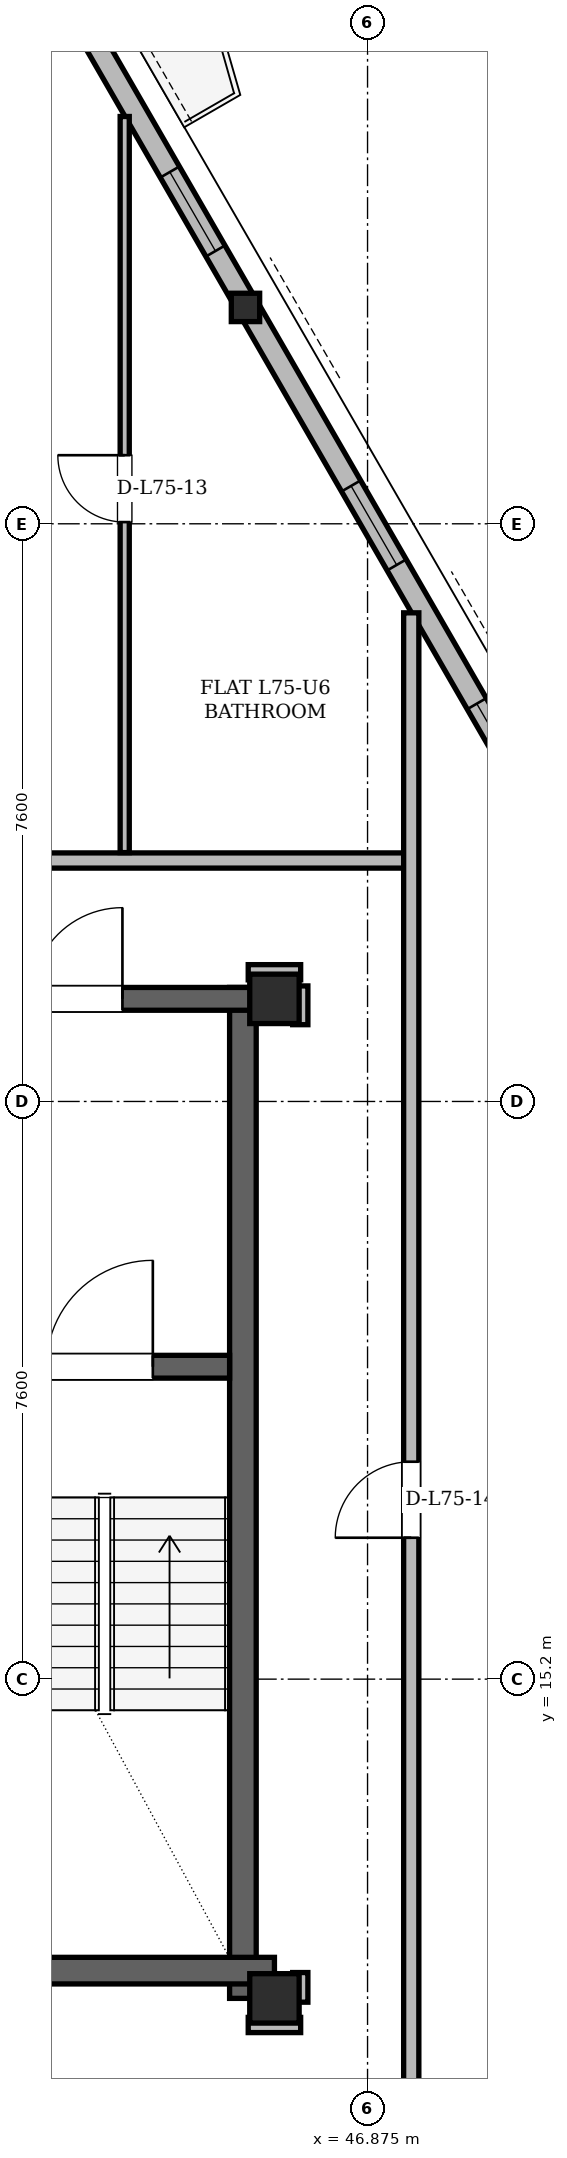
"""IFC4 building model, lengths in metres.
Left out: names, types, materials, properties, quantities, classifications, styles, units other than length and angle.
Written with IfcOpenShell. Run it as: python <this file> out.ifc"""

import sys

from ifc_helpers import new_model, si_unit, direction, frame, frame_2d, origin, origin_2d, place, context, subcontext, project, spatial, rectangle, hollow_rectangle, i_section, extrude, element, fill, save


model = new_model("IFC4")
c1 = context("Model", 3, precision=1e-05, world=origin(), true_north=direction((0.0, 1.0)))
c2 = subcontext(c1, "Body", "Model", "MODEL_VIEW")
j1 = project(units=[si_unit("LENGTHUNIT", "METRE"), si_unit("PLANEANGLEUNIT", "RADIAN")], contexts=[c1])
p1 = place(None, origin())
s1 = spatial("IfcSite", under=j1, at=p1, CompositionType="ELEMENT")
p2 = place(p1, origin())
s2 = spatial("IfcBuilding", under=s1, at=p2, CompositionType="ELEMENT")
p3 = place(p2, frame((0.0, 0.0, 285.0)))
s3 = spatial("IfcBuildingStorey", under=s2, at=p3, CompositionType="ELEMENT", Elevation=285.0)
for number, where, z_axis, x_axis in (
    (1, (45.65, 11.0, 0.0), (0.0, 0.0, 1.0), (1.0, 0.0, 0.0)),
    (2, (45.65, 24.15, 0.0), (0.0, 0.0, 1.0), (1.0, 0.0, 0.0)),
):
    element("IfcColumn", number, at=place(p3, frame(where, z_axis=z_axis, x_axis=x_axis)), inside=s3, PredefinedType="COLUMN", context=c2, shape_type="SweptSolid", body=[
        extrude(hollow_rectangle(XDim=0.65, YDim=0.65, WallThickness=0.05, at=origin_2d()), origin(), (0.0, 0.0, 1.0), 3.9),
    ])
p4 = place(p3, frame((45.296, 33.257, 0.004), z_axis=(-0.013990144915, -0.005395302523, 0.999887576958), x_axis=(0.359820037684, -0.933021725621, 0.0)))
e3 = element("IfcColumn", 3, at=p4, inside=s3, PredefinedType="COLUMN", context=c2, shape_type="SweptSolid", body=[
    extrude(i_section(OverallWidth=0.373, OverallDepth=0.373, WebThickness=0.016, FlangeThickness=0.026, at=origin_2d()), origin(), (0.0, 0.0, 1.0), 3.892),
])
p5 = place(p3, frame((45.235, 11.0, 0.0), z_axis=(0.0, 0.0, 1.0), x_axis=(0.0, 1.0, 0.0)))
e4 = element("IfcWall", 4, at=p5, inside=s3, PredefinedType="SHEAR", context=c2, shape_type="SweptSolid", body=[
    extrude(rectangle(XDim=13.3, YDim=0.35, at=frame_2d((6.65, 0.0))), origin(), (0.0, 0.0, 1.0), 3.68),
])
p6 = place(p3, frame((38.55, 11.365, 0.0), z_axis=(0.0, 0.0, 1.0), x_axis=(1.0, 0.0, 0.0)))
e5 = element("IfcWall", 5, at=p6, inside=s3, PredefinedType="SHEAR", context=c2, shape_type="SweptSolid", body=[
    extrude(rectangle(XDim=7.1, YDim=0.35, at=frame_2d((3.55, 0.0))), origin(), (0.0, 0.0, 1.0), 3.68),
])
p7 = place(p3, frame((29.65, 24.15, 0.0), z_axis=(0.0, 0.0, 1.0), x_axis=(1.0, 0.0, 0.0)))
e6 = element("IfcWall", 6, at=p7, inside=s3, PredefinedType="SHEAR", context=c2, shape_type="SweptSolid", body=[
    extrude(rectangle(XDim=15.7, YDim=0.3, at=frame_2d((7.85, 0.0))), origin(), (0.0, 0.0, 1.0), 3.68),
])
p8 = place(p7, frame((1.7, 0.0, 0.0)))
e7 = element("IfcOpeningElement", 7, at=p8, cuts=e6, PredefinedType="OPENING", context=c2, shape_type="SweptSolid", body=[
    extrude(rectangle(XDim=1.2, YDim=2.2, at=frame_2d((0.6, 1.1))), frame((0.0, 0.15, 0.0), z_axis=(0.0, -1.0, 0.0), x_axis=(1.0, 0.0, 0.0)), (0.0, 0.0, 1.0), 0.3),
])
p9 = place(p7, frame((12.8, 0.0, 0.0)))
e8 = element("IfcOpeningElement", 8, at=p9, cuts=e6, PredefinedType="OPENING", context=c2, shape_type="SweptSolid", body=[
    extrude(rectangle(XDim=1.2, YDim=2.2, at=frame_2d((0.6, 1.1))), frame((0.0, 0.15, 0.0), z_axis=(0.0, -1.0, 0.0), x_axis=(1.0, 0.0, 0.0)), (0.0, 0.0, 1.0), 0.3),
])
p10 = place(p7, frame((6.55, 0.0, 0.0)))
e9 = element("IfcOpeningElement", 9, at=p10, cuts=e6, PredefinedType="OPENING", context=c2, shape_type="SweptSolid", body=[
    extrude(rectangle(XDim=0.9, YDim=2.05, at=frame_2d((0.45, 1.025))), frame((0.0, 0.15, 0.0), z_axis=(0.0, -1.0, 0.0), x_axis=(1.0, 0.0, 0.0)), (0.0, 0.0, 1.0), 0.3),
])
p11 = place(p7, frame((8.45, 0.0, 0.0)))
e10 = element("IfcOpeningElement", 10, at=p11, cuts=e6, PredefinedType="OPENING", context=c2, shape_type="SweptSolid", body=[
    extrude(rectangle(XDim=0.9, YDim=2.05, at=frame_2d((0.45, 1.025))), frame((0.0, 0.15, 0.0), z_axis=(0.0, -1.0, 0.0), x_axis=(1.0, 0.0, 0.0)), (0.0, 0.0, 1.0), 0.3),
])
p12 = place(p3, frame((41.05, 19.31, 0.0), z_axis=(0.0, 0.0, 1.0), x_axis=(1.0, 0.0, 0.0)))
e11 = element("IfcWall", 11, at=p12, inside=s3, PredefinedType="SHEAR", context=c2, shape_type="SweptSolid", body=[
    extrude(rectangle(XDim=4.01, YDim=0.3, at=frame_2d((2.005, 0.0))), origin(), (0.0, 0.0, 1.0), 3.68),
])
p13 = place(p12, frame((1.6, 0.0, 0.0)))
e12 = element("IfcOpeningElement", 12, at=p13, cuts=e11, PredefinedType="OPENING", context=c2, shape_type="SweptSolid", body=[
    extrude(rectangle(XDim=1.4, YDim=2.2, at=frame_2d((0.7, 1.1))), frame((0.0, 0.15, 0.0), z_axis=(0.0, -1.0, 0.0), x_axis=(1.0, 0.0, 0.0)), (0.0, 0.0, 1.0), 0.3),
])
p14 = place(p3, frame((58.415, 10.535, 0.0), z_axis=(0.0, 0.0, 1.0), x_axis=(-0.499999864727, 0.866025481884, 0.0)))
e13 = element("IfcWall", 13, at=p14, inside=s3, PredefinedType="SOLIDWALL", context=c2, shape_type="SweptSolid", body=[
    extrude(rectangle(XDim=37.481, YDim=0.29, at=frame_2d((18.74, 0.0))), origin(), (0.0, 0.0, 1.0), 3.058),
])
p15 = place(p14, frame((7.504, 0.0, 0.0)))
e14 = element("IfcOpeningElement", 14, at=p15, cuts=e13, PredefinedType="OPENING", context=c2, shape_type="SweptSolid", body=[
    extrude(rectangle(XDim=1.3, YDim=2.2, at=frame_2d((0.65, 1.1))), frame((0.0, 0.145, 0.0), z_axis=(0.0, -1.0, 0.0), x_axis=(1.0, 0.0, 0.0)), (0.0, 0.0, 1.0), 0.29),
])
p16 = place(p14, frame((32.341, 0.0, 0.0)))
e15 = element("IfcOpeningElement", 15, at=p16, cuts=e13, PredefinedType="OPENING", context=c2, shape_type="SweptSolid", body=[
    extrude(rectangle(XDim=1.5, YDim=2.2, at=frame_2d((0.75, 1.1))), frame((0.0, 0.145, 0.0), z_axis=(0.0, -1.0, 0.0), x_axis=(1.0, 0.0, 0.0)), (0.0, 0.0, 1.0), 0.29),
])
p17 = place(p14, frame((12.54, 0.0, 0.85)))
e16 = element("IfcOpeningElement", 16, at=p17, cuts=e13, PredefinedType="OPENING", context=c2, shape_type="SweptSolid", body=[
    extrude(rectangle(XDim=1.4, YDim=1.6, at=frame_2d((0.7, 0.8))), frame((0.0, 0.145, 0.0), z_axis=(0.0, -1.0, 0.0), x_axis=(1.0, 0.0, 0.0)), (0.0, 0.0, 1.0), 0.29),
])
p18 = place(p14, frame((17.705, 0.0, 0.85)))
e17 = element("IfcOpeningElement", 17, at=p18, cuts=e13, PredefinedType="OPENING", context=c2, shape_type="SweptSolid", body=[
    extrude(rectangle(XDim=2.5, YDim=2.098, at=frame_2d((1.25, 1.049))), frame((0.0, 0.145, 0.0), z_axis=(0.0, -1.0, 0.0), x_axis=(1.0, 0.0, 0.0)), (0.0, 0.0, 1.0), 0.29),
])
p19 = place(p14, frame((2.467, 0.0, 0.85)))
e18 = element("IfcOpeningElement", 18, at=p19, cuts=e13, PredefinedType="OPENING", context=c2, shape_type="SweptSolid", body=[
    extrude(rectangle(XDim=2.5, YDim=2.098, at=frame_2d((1.25, 1.049))), frame((0.0, 0.145, 0.0), z_axis=(0.0, -1.0, 0.0), x_axis=(1.0, 0.0, 0.0)), (0.0, 0.0, 1.0), 0.29),
])
p20 = place(p14, frame((27.081, 0.0, 0.85)))
e19 = element("IfcOpeningElement", 19, at=p20, cuts=e13, PredefinedType="OPENING", context=c2, shape_type="SweptSolid", body=[
    extrude(rectangle(XDim=1.2, YDim=1.48, at=frame_2d((0.6, 0.74))), frame((0.0, 0.145, 0.0), z_axis=(0.0, -1.0, 0.0), x_axis=(1.0, 0.0, 0.0)), (0.0, 0.0, 1.0), 0.29),
])
p21 = place(p14, frame((34.388, 0.0, 0.85)))
e20 = element("IfcOpeningElement", 20, at=p21, cuts=e13, PredefinedType="OPENING", context=c2, shape_type="SweptSolid", body=[
    extrude(rectangle(XDim=1.8, YDim=1.75, at=frame_2d((0.9, 0.875))), frame((0.0, 0.145, 0.0), z_axis=(0.0, -1.0, 0.0), x_axis=(1.0, 0.0, 0.0)), (0.0, 0.0, 1.0), 0.29),
])
p22 = place(p14, frame((22.312, 0.0, 0.85)))
e21 = element("IfcOpeningElement", 21, at=p22, cuts=e13, PredefinedType="OPENING", context=c2, shape_type="SweptSolid", body=[
    extrude(rectangle(XDim=1.2, YDim=1.48, at=frame_2d((0.6, 0.74))), frame((0.0, 0.145, 0.0), z_axis=(0.0, -1.0, 0.0), x_axis=(1.0, 0.0, 0.0)), (0.0, 0.0, 1.0), 0.29),
])
p23 = place(p3, frame((45.305, 10.65, 0.0), z_axis=(0.0, 0.0, 1.0), x_axis=(1.0, 0.0, 0.0)))
e22 = element("IfcWall", 22, at=p23, inside=s3, PredefinedType="PARTITIONING", context=c2, shape_type="SweptSolid", body=[
    extrude(rectangle(XDim=0.69, YDim=0.2, at=frame_2d((0.345, 0.0))), origin(), (0.0, 0.0, 1.0), 3.68),
])
p24 = place(p3, frame((45.305, 24.5, 0.0), z_axis=(0.0, 0.0, 1.0), x_axis=(1.0, 0.0, 0.0)))
e23 = element("IfcWall", 23, at=p24, inside=s3, PredefinedType="PARTITIONING", context=c2, shape_type="SweptSolid", body=[
    extrude(rectangle(XDim=0.69, YDim=0.2, at=frame_2d((0.345, 0.0))), origin(), (0.0, 0.0, 1.0), 3.266),
])
p25 = place(p3, frame((25.67, 25.97, 0.0), z_axis=(0.0, 0.0, 1.0), x_axis=(1.0, 0.0, 0.0)))
e24 = element("IfcWall", 24, at=p25, inside=s3, PredefinedType="PARTITIONING", context=c2, shape_type="SweptSolid", body=[
    extrude(rectangle(XDim=21.78, YDim=0.2, at=frame_2d((10.89, 0.0))), origin(), (0.0, 0.0, 1.0), 3.266),
])
p26 = place(p25, frame((3.709, 0.0, 0.0)))
e25 = element("IfcOpeningElement", 25, at=p26, cuts=e24, PredefinedType="OPENING", context=c2, shape_type="SweptSolid", body=[
    extrude(rectangle(XDim=1.0, YDim=2.18, at=frame_2d((0.5, 1.09))), frame((0.0, 0.1, 0.0), z_axis=(0.0, -1.0, 0.0), x_axis=(1.0, 0.0, 0.0)), (0.0, 0.0, 1.0), 0.2),
])
p27 = place(p25, frame((9.68, 0.0, 0.0)))
e26 = element("IfcOpeningElement", 26, at=p27, cuts=e24, PredefinedType="OPENING", context=c2, shape_type="SweptSolid", body=[
    extrude(rectangle(XDim=1.3, YDim=2.2, at=frame_2d((0.65, 1.1))), frame((0.0, 0.1, 0.0), z_axis=(0.0, -1.0, 0.0), x_axis=(1.0, 0.0, 0.0)), (0.0, 0.0, 1.0), 0.2),
])
p28 = place(p25, frame((14.872, 0.0, 0.0)))
e27 = element("IfcOpeningElement", 27, at=p28, cuts=e24, PredefinedType="OPENING", context=c2, shape_type="SweptSolid", body=[
    extrude(rectangle(XDim=1.0, YDim=2.18, at=frame_2d((0.5, 1.09))), frame((0.0, 0.1, 0.0), z_axis=(0.0, -1.0, 0.0), x_axis=(1.0, 0.0, 0.0)), (0.0, 0.0, 1.0), 0.2),
])
p29 = place(p3, frame((43.68, 26.074, 0.0), z_axis=(0.0, 0.0, 1.0), x_axis=(0.0, 1.0, 0.0)))
e28 = element("IfcWall", 28, at=p29, inside=s3, PredefinedType="PARTITIONING", context=c2, shape_type="SweptSolid", body=[
    extrude(rectangle(XDim=9.684, YDim=0.12, at=frame_2d((4.842, 0.0))), origin(), (0.0, 0.0, 1.0), 3.266),
])
p30 = place(p29, frame((4.348, 0.0, 0.0)))
e29 = element("IfcOpeningElement", 29, at=p30, cuts=e28, PredefinedType="OPENING", context=c2, shape_type="SweptSolid", body=[
    extrude(rectangle(XDim=0.88, YDim=2.08, at=frame_2d((0.44, 1.04))), frame((0.0, 0.06, 0.0), z_axis=(0.0, -1.0, 0.0), x_axis=(1.0, 0.0, 0.0)), (0.0, 0.0, 1.0), 0.12),
])
p31 = place(p3, frame((45.99, 10.95, 0.0), z_axis=(0.0, 0.0, 1.0), x_axis=(0.0, 1.0, 0.0)))
e30 = element("IfcWall", 30, at=p31, inside=s3, PredefinedType="PARTITIONING", context=c2, shape_type="SweptSolid", body=[
    extrude(rectangle(XDim=0.39, YDim=0.2, at=frame_2d((0.195, 0.0))), origin(), (0.0, 0.0, 1.0), 3.68),
])
p32 = place(p3, frame((45.99, 23.81, 0.0), z_axis=(0.0, 0.0, 1.0), x_axis=(0.0, 1.0, 0.0)))
e31 = element("IfcWall", 31, at=p32, inside=s3, PredefinedType="PARTITIONING", context=c2, shape_type="SweptSolid", body=[
    extrude(rectangle(XDim=0.51, YDim=0.2, at=frame_2d((0.255, 0.0))), origin(), (0.0, 0.0, 1.0), 3.68),
])
p33 = place(p3, frame((47.45, 6.919, 0.0), z_axis=(0.0, 0.0, 1.0), x_axis=(0.0, 1.0, 0.0)))
e32 = element("IfcWall", 32, at=p33, inside=s3, PredefinedType="PARTITIONING", context=c2, shape_type="SweptSolid", body=[
    extrude(rectangle(XDim=22.31, YDim=0.2, at=frame_2d((11.155, 0.0))), origin(), (0.0, 0.0, 1.0), 3.058),
])
p34 = place(p33, frame((10.142, 0.0, 0.0)))
e33 = element("IfcOpeningElement", 33, at=p34, cuts=e32, PredefinedType="OPENING", context=c2, shape_type="SweptSolid", body=[
    extrude(rectangle(XDim=1.0, YDim=2.18, at=frame_2d((0.5, 1.09))), frame((0.0, 0.1, 0.0), z_axis=(0.0, -1.0, 0.0), x_axis=(1.0, 0.0, 0.0)), (0.0, 0.0, 1.0), 0.2),
])
p35 = place(p18, origin())
e34 = element("IfcWindow", 34, at=p35, inside=s3, PartitioningType="SINGLE_PANEL", PredefinedType="WINDOW", context=c2, shape_type="SweptSolid", body=[
    extrude(rectangle(XDim=2.5, YDim=2.098, at=frame_2d((1.25, 1.049))), frame((0.0, 0.03, 0.0), z_axis=(0.0, -1.0, 0.0), x_axis=(1.0, 0.0, 0.0)), (0.0, 0.0, 1.0), 0.06),
])
fill(e17, e34)
p36 = place(p20, origin())
e35 = element("IfcWindow", 35, at=p36, inside=s3, PartitioningType="SINGLE_PANEL", PredefinedType="WINDOW", context=c2, shape_type="SweptSolid", body=[
    extrude(rectangle(XDim=1.2, YDim=1.48, at=frame_2d((0.6, 0.74))), frame((0.0, 0.03, 0.0), z_axis=(0.0, -1.0, 0.0), x_axis=(1.0, 0.0, 0.0)), (0.0, 0.0, 1.0), 0.06),
])
fill(e19, e35)
p37 = place(p22, origin())
e36 = element("IfcWindow", 36, at=p37, inside=s3, PartitioningType="SINGLE_PANEL", PredefinedType="WINDOW", context=c2, shape_type="SweptSolid", body=[
    extrude(rectangle(XDim=1.2, YDim=1.48, at=frame_2d((0.6, 0.74))), frame((0.0, 0.03, 0.0), z_axis=(0.0, -1.0, 0.0), x_axis=(1.0, 0.0, 0.0)), (0.0, 0.0, 1.0), 0.06),
])
fill(e21, e36)
p38 = place(p13, origin())
e37 = element("IfcDoor", 37, at=p38, inside=s3, OperationType="SINGLE_SWING_RIGHT", PredefinedType="DOOR", context=c2, shape_type="SweptSolid", body=[
    extrude(rectangle(XDim=1.4, YDim=2.2, at=frame_2d((0.7, 1.1))), frame((0.0, 0.025, 0.0), z_axis=(0.0, -1.0, 0.0), x_axis=(1.0, 0.0, 0.0)), (0.0, 0.0, 1.0), 0.05),
])
fill(e12, e37)
p39 = place(p9, origin())
e38 = element("IfcDoor", 38, at=p39, inside=s3, OperationType="SINGLE_SWING_RIGHT", PredefinedType="DOOR", context=c2, shape_type="SweptSolid", body=[
    extrude(rectangle(XDim=1.2, YDim=2.2, at=frame_2d((0.6, 1.1))), frame((0.0, 0.025, 0.0), z_axis=(0.0, -1.0, 0.0), x_axis=(1.0, 0.0, 0.0)), (0.0, 0.0, 1.0), 0.05),
])
fill(e8, e38)
p40 = place(p30, origin())
e39 = element("IfcDoor", 39, at=p40, inside=s3, OperationType="SINGLE_SWING_RIGHT", PredefinedType="DOOR", context=c2, shape_type="SweptSolid", body=[
    extrude(rectangle(XDim=0.88, YDim=2.08, at=frame_2d((0.44, 1.04))), frame((0.0, 0.025, 0.0), z_axis=(0.0, -1.0, 0.0), x_axis=(1.0, 0.0, 0.0)), (0.0, 0.0, 1.0), 0.05),
])
fill(e29, e39)
p41 = place(p34, origin())
e40 = element("IfcDoor", 40, at=p41, inside=s3, OperationType="SINGLE_SWING_LEFT", PredefinedType="DOOR", context=c2, shape_type="SweptSolid", body=[
    extrude(rectangle(XDim=1.0, YDim=2.18, at=frame_2d((0.5, 1.09))), frame((0.0, 0.025, 0.0), z_axis=(0.0, -1.0, 0.0), x_axis=(1.0, 0.0, 0.0)), (0.0, 0.0, 1.0), 0.05),
])
fill(e33, e40)
save(model, sys.argv[1])
